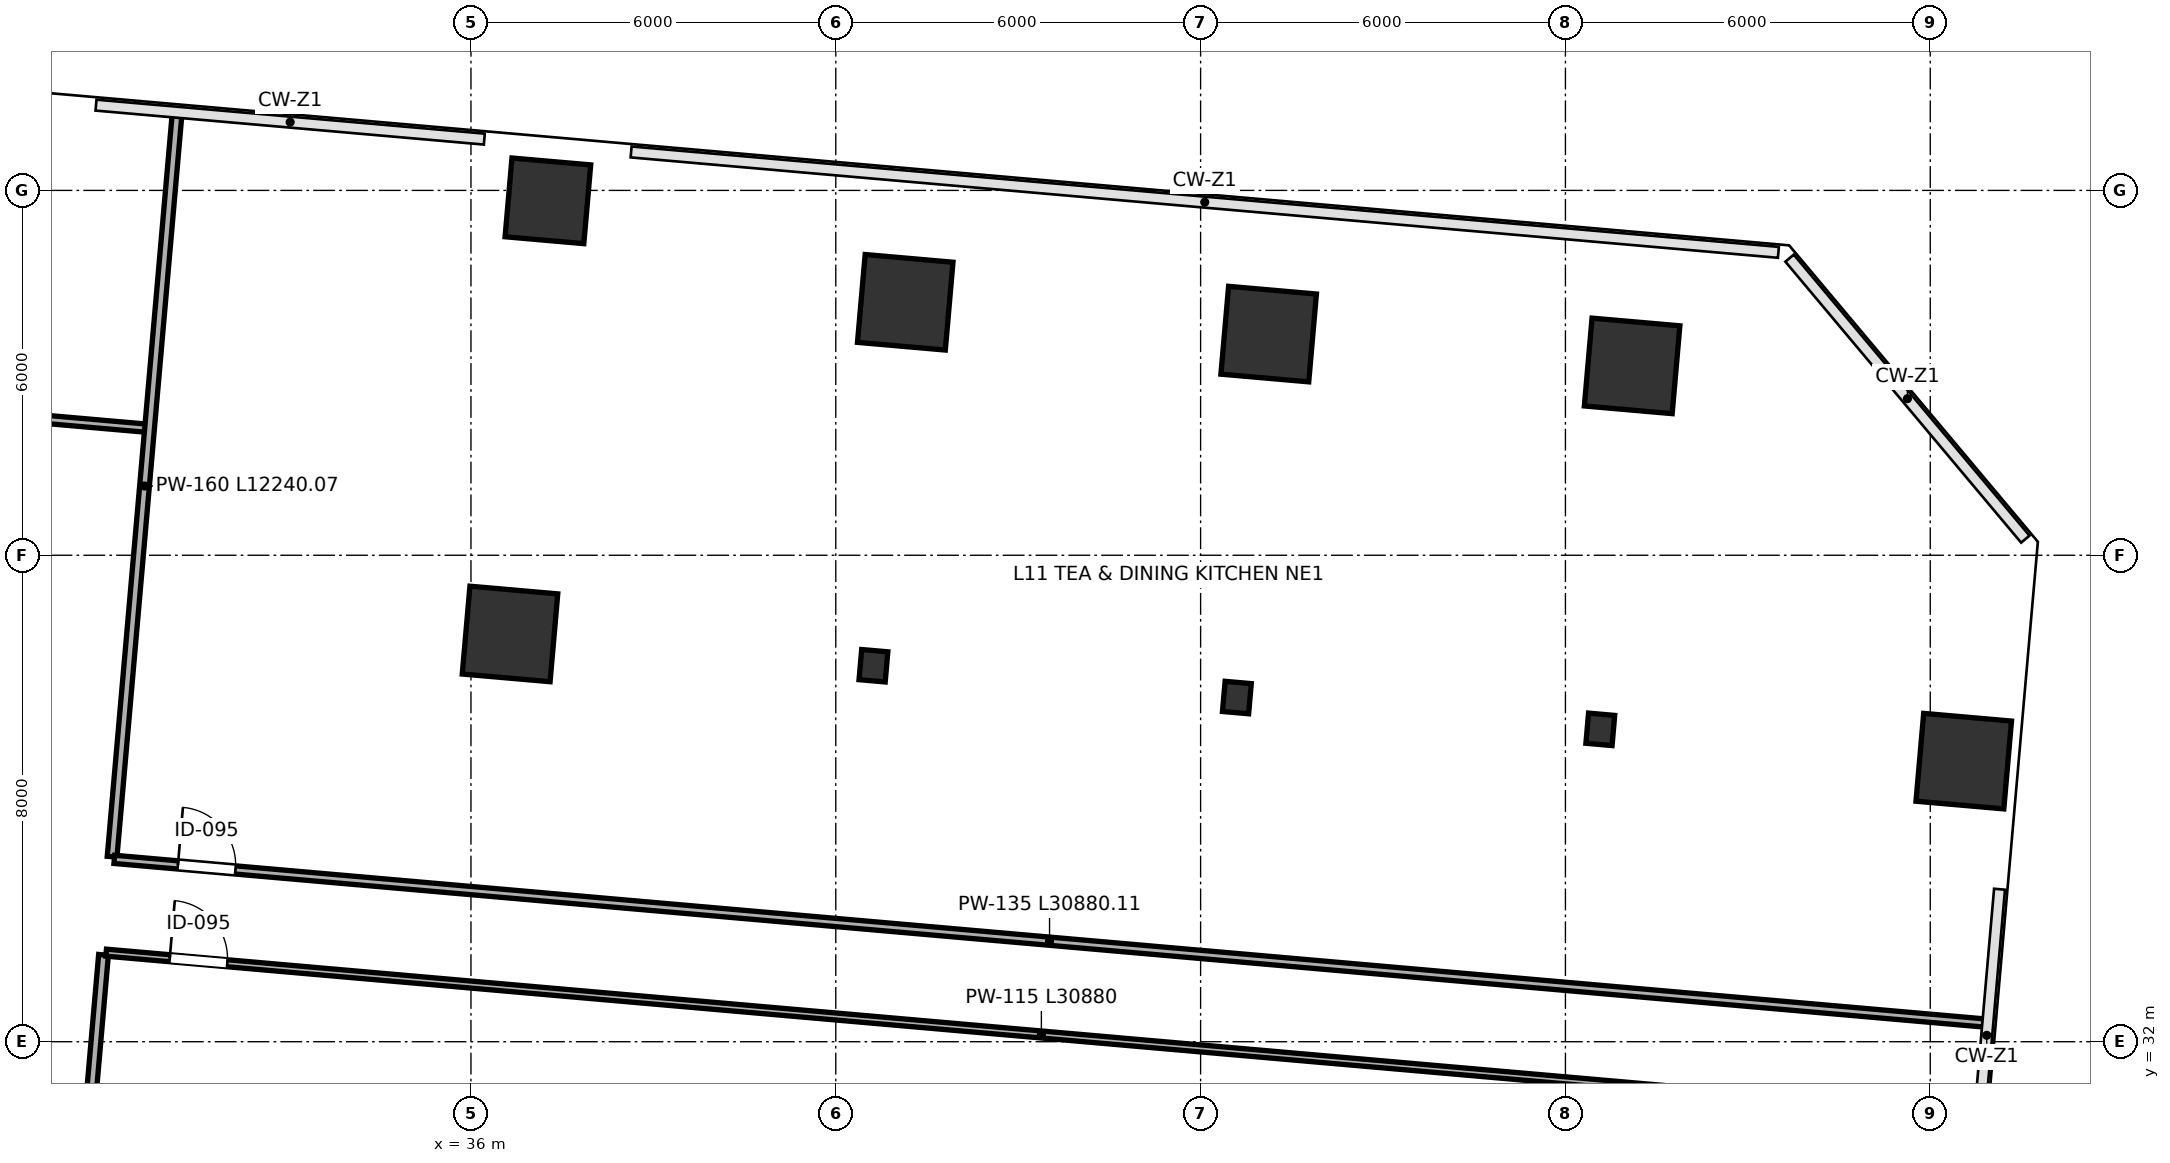
"""IFC4 building model, lengths in metres.
Left out: names, types, materials, properties, quantities, classifications, styles, units other than length and angle.
Written with IfcOpenShell. Run it as: python <this file> out.ifc"""

import sys

from ifc_helpers import new_model, si_unit, direction, frame, frame_2d, origin, origin_2d, place, context, subcontext, project, spatial, rectangle, i_section, extrude, clip, halfspace, source, transform, mapped, element, fill, save


model = new_model("IFC4")
c1 = context("Model", 3, precision=1e-05, world=origin(), true_north=direction((0.0, 1.0)))
c2 = subcontext(c1, "Body", "Model", "MODEL_VIEW")
j1 = project(units=[si_unit("LENGTHUNIT", "METRE"), si_unit("PLANEANGLEUNIT", "RADIAN")], contexts=[c1])
p1 = place(None, origin())
s1 = spatial("IfcSite", under=j1, at=p1, CompositionType="ELEMENT")
p2 = place(p1, origin())
s2 = spatial("IfcBuilding", under=s1, at=p2, CompositionType="ELEMENT")
p3 = place(p2, frame((0.0, 0.0, 52.0)))
s3 = spatial("IfcBuildingStorey", under=s2, at=p3, CompositionType="ELEMENT", Elevation=52.0)
p4 = place(p3, frame((28.3, 46.613, 0.0), z_axis=(0.06589332662, -0.031551692962, 0.997327709521), x_axis=(-0.508628404155, -0.860962602344, 0.006367405439)))
e1 = element("IfcColumn", 1, at=p4, inside=s3, PredefinedType="COLUMN", context=c2, shape_type="Clipping", body=[
    clip(clip(extrude(rectangle(XDim=1.3, YDim=1.3, at=origin_2d()), origin(), (0.0, 0.0, 1.0), 4.813), halfspace(frame((0.0, 0.0, 0.052), z_axis=(0.0, 0.0, -1.0), x_axis=(1.0, 0.0, 0.0)), False)), halfspace(frame((0.0, 0.0, 4.761), z_axis=(0.0, 0.0, 1.0), x_axis=(1.0, 0.0, 0.0)), False)),
])
p5 = place(p3, frame((36.642, 38.706, 0.0), z_axis=(0.029670337243, -0.068977194275, 0.997176924), x_axis=(-0.949466178775, -0.313801126567, 0.006544335611)))
e2 = element("IfcColumn", 2, at=p5, inside=s3, PredefinedType="COLUMN", context=c2, shape_type="Clipping", body=[
    clip(clip(extrude(rectangle(XDim=1.45, YDim=1.45, at=origin_2d()), origin(), (0.0, 0.0, 1.0), 4.814), halfspace(frame((0.0, 0.0, 0.06), z_axis=(0.0, 0.0, -1.0), x_axis=(1.0, 0.0, 0.0)), False)), halfspace(frame((0.0, 0.0, 4.754), z_axis=(0.0, 0.0, 1.0), x_axis=(1.0, 0.0, 0.0)), False)),
])
p6 = place(p3, frame((37.265, 45.829, 0.0), z_axis=(0.061822361159, -0.071999506607, 0.995486849089), x_axis=(-0.812325724123, -0.583145357305, 0.008271044762)))
e3 = element("IfcColumn", 3, at=p6, inside=s3, PredefinedType="COLUMN", context=c2, shape_type="Clipping", body=[
    clip(clip(extrude(rectangle(XDim=1.3, YDim=1.3, at=origin_2d()), origin(), (0.0, 0.0, 1.0), 4.822), halfspace(frame((0.0, 0.0, 0.068), z_axis=(0.0, 0.0, -1.0), x_axis=(1.0, 0.0, 0.0)), False)), halfspace(frame((0.0, 0.0, 4.754), z_axis=(0.0, 0.0, 1.0), x_axis=(1.0, 0.0, 0.0)), False)),
])
p7 = place(p3, frame((42.619, 38.183, 0.0), z_axis=(0.026924325259, -0.09580403706, 0.995036013013), x_axis=(-0.982504678584, -0.186035828863, 0.008673346471)))
e4 = element("IfcColumn", 4, at=p7, inside=s3, PredefinedType="COLUMN", context=c2, shape_type="Clipping", body=[
    clip(clip(extrude(i_section(OverallWidth=0.432, OverallDepth=0.498, WebThickness=0.056, FlangeThickness=0.089, FilletRadius=0.015, at=origin_2d()), origin(), (0.0, 0.0, 1.0), 4.824), halfspace(frame((0.0, 0.0, 0.027), z_axis=(0.0, 0.0, -1.0), x_axis=(1.0, 0.0, 0.0)), False)), halfspace(frame((0.0, 0.0, 4.797), z_axis=(0.0, 0.0, 1.0), x_axis=(1.0, 0.0, 0.0)), False)),
])
p8 = place(p3, frame((43.142, 44.16, 0.0), z_axis=(0.053877269241, -0.098303272676, 0.993696989248), x_axis=(-0.915216687405, -0.402843592449, 0.009770113497)))
e5 = element("IfcColumn", 5, at=p8, inside=s3, PredefinedType="COLUMN", context=c2, shape_type="Clipping", body=[
    clip(clip(extrude(rectangle(XDim=1.45, YDim=1.45, at=origin_2d()), origin(), (0.0, 0.0, 1.0), 4.831), halfspace(frame((0.0, 0.0, 0.089), z_axis=(0.0, 0.0, -1.0), x_axis=(1.0, 0.0, 0.0)), False)), halfspace(frame((0.0, 0.0, 4.741), z_axis=(0.0, 0.0, 1.0), x_axis=(1.0, 0.0, 0.0)), False)),
])
p9 = place(p3, frame((48.596, 37.66, 0.0), z_axis=(0.02417236025, -0.122476656215, 0.992176983044), x_axis=(-0.99408551694, -0.108053693523, 0.010880456154)))
e6 = element("IfcColumn", 6, at=p9, inside=s3, PredefinedType="COLUMN", context=c2, shape_type="Clipping", body=[
    clip(clip(extrude(i_section(OverallWidth=0.432, OverallDepth=0.498, WebThickness=0.056, FlangeThickness=0.089, FilletRadius=0.015, at=origin_2d()), origin(), (0.0, 0.0, 1.0), 4.838), halfspace(frame((0.0, 0.0, 0.034), z_axis=(0.0, 0.0, -1.0), x_axis=(1.0, 0.0, 0.0)), False)), halfspace(frame((0.0, 0.0, 4.803), z_axis=(0.0, 0.0, 1.0), x_axis=(1.0, 0.0, 0.0)), False)),
])
p10 = place(p3, frame((49.119, 43.637, 0.0), z_axis=(0.051051601458, -0.124983190143, 0.990844557017), x_axis=(-0.954881453991, -0.296754029116, 0.011766691454)))
e7 = element("IfcColumn", 7, at=p10, inside=s3, PredefinedType="COLUMN", context=c2, shape_type="Clipping", body=[
    clip(clip(extrude(rectangle(XDim=1.45, YDim=1.45, at=origin_2d()), origin(), (0.0, 0.0, 1.0), 4.844), halfspace(frame((0.0, 0.0, 0.108), z_axis=(0.0, 0.0, -1.0), x_axis=(1.0, 0.0, 0.0)), False)), halfspace(frame((0.0, 0.0, 4.737), z_axis=(0.0, 0.0, 1.0), x_axis=(1.0, 0.0, 0.0)), False)),
])
p11 = place(p3, frame((54.573, 37.137, 0.0), z_axis=(0.021471147851, -0.148839807117, 0.988628191803), x_axis=(-0.998290790229, -0.056953640273, 0.013106525213)))
e8 = element("IfcColumn", 8, at=p11, inside=s3, PredefinedType="COLUMN", context=c2, shape_type="Clipping", body=[
    clip(clip(extrude(i_section(OverallWidth=0.432, OverallDepth=0.498, WebThickness=0.056, FlangeThickness=0.089, FilletRadius=0.015, at=origin_2d()), origin(), (0.0, 0.0, 1.0), 4.855), halfspace(frame((0.0, 0.0, 0.041), z_axis=(0.0, 0.0, -1.0), x_axis=(1.0, 0.0, 0.0)), False)), halfspace(frame((0.0, 0.0, 4.814), z_axis=(0.0, 0.0, 1.0), x_axis=(1.0, 0.0, 0.0)), False)),
])
p12 = place(p3, frame((55.096, 43.114, 0.0), z_axis=(0.048258163497, -0.151302649966, 0.987308795549), x_axis=(-0.975236227895, -0.220732225493, 0.013841402757)))
e9 = element("IfcColumn", 9, at=p12, inside=s3, PredefinedType="COLUMN", context=c2, shape_type="Clipping", body=[
    clip(clip(extrude(rectangle(XDim=1.45, YDim=1.45, at=origin_2d()), origin(), (0.0, 0.0, 1.0), 4.862), halfspace(frame((0.0, 0.0, 0.127), z_axis=(0.0, 0.0, -1.0), x_axis=(1.0, 0.0, 0.0)), False)), halfspace(frame((0.0, 0.0, 4.735), z_axis=(0.0, 0.0, 1.0), x_axis=(1.0, 0.0, 0.0)), False)),
])
p13 = place(p3, frame((60.551, 36.614, 0.0), z_axis=(0.018725699159, -0.174940087863, 0.984400992406), x_axis=(-0.999667743426, -0.020718762874, 0.015334132473)))
e10 = element("IfcColumn", 10, at=p13, inside=s3, PredefinedType="COLUMN", context=c2, shape_type="Clipping", body=[
    clip(clip(extrude(rectangle(XDim=1.45, YDim=1.45, at=origin_2d()), origin(), (0.0, 0.0, 1.0), 4.876), halfspace(frame((0.0, 0.0, 0.141), z_axis=(0.0, 0.0, -1.0), x_axis=(1.0, 0.0, 0.0)), False)), halfspace(frame((0.0, 0.0, 4.735), z_axis=(0.0, 0.0, 1.0), x_axis=(1.0, 0.0, 0.0)), False)),
])
p14 = place(p3, frame((5.7, 44.274, 0.0), z_axis=(0.0, 0.0, 1.0), x_axis=(0.996195324028, -0.087148587968, 0.0)))
e11 = element("IfcWall", 11, at=p14, inside=s3, PredefinedType="PARTITIONING", context=c2, shape_type="SweptSolid", body=[
    extrude(rectangle(XDim=25.07, YDim=0.135, at=frame_2d((12.535, 0.0))), origin(), (0.0, 0.0, 1.0), 4.56),
])
p15 = place(p14, frame((1.05, 0.0, 0.0)))
e12 = element("IfcOpeningElement", 12, at=p15, cuts=e11, PredefinedType="OPENING", context=c2, shape_type="SweptSolid", body=[
    extrude(rectangle(XDim=0.95, YDim=2.15, at=frame_2d((0.475, 1.075))), frame((0.0, 0.078, 0.0), z_axis=(0.0, -1.0, 0.0), x_axis=(1.0, 0.0, 0.0)), (0.0, 0.0, 1.0), 0.155),
])
p16 = place(p3, frame((30.098, 35.042, 0.0), z_axis=(0.0, 0.0, 1.0), x_axis=(0.087145176091, 0.996195622498, 0.0)))
e13 = element("IfcWall", 13, at=p16, inside=s3, PredefinedType="PARTITIONING", context=c2, shape_type="SweptSolid", body=[
    extrude(rectangle(XDim=12.24, YDim=0.16, at=frame_2d((6.12, 0.0))), origin(), (0.0, 0.0, 1.0), 3.695),
])
p17 = place(p3, frame((28.198, 13.325, 0.0), z_axis=(0.0, 0.0, 1.0), x_axis=(0.087154794008, 0.996194781095, 0.0)))
e14 = element("IfcWall", 14, at=p17, inside=s3, PredefinedType="PARTITIONING", context=c2, shape_type="SweptSolid", body=[
    extrude(rectangle(XDim=20.18, YDim=0.16, at=frame_2d((10.09, 0.0))), origin(), (0.0, 0.0, 1.0), 4.56),
])
p18 = place(p3, frame((30.134, 34.999, 0.0), z_axis=(0.0, 0.0, 1.0), x_axis=(0.996195270611, -0.087149198574, 0.0)))
e15 = element("IfcWall", 15, at=p18, inside=s3, PredefinedType="PARTITIONING", context=c2, shape_type="SweptSolid", body=[
    extrude(rectangle(XDim=30.88, YDim=0.135, at=frame_2d((15.44, 0.0))), origin(), (0.0, 0.0, 1.0), 3.695),
])
p19 = place(p18, frame((1.05, 0.0, 0.0)))
e16 = element("IfcOpeningElement", 16, at=p19, cuts=e15, PredefinedType="OPENING", context=c2, shape_type="SweptSolid", body=[
    extrude(rectangle(XDim=0.95, YDim=2.15, at=frame_2d((0.475, 1.075))), frame((0.0, 0.078, 0.0), z_axis=(0.0, -1.0, 0.0), x_axis=(1.0, 0.0, 0.0)), (0.0, 0.0, 1.0), 0.155),
])
p20 = place(p3, frame((30.0, 33.465, 0.0), z_axis=(0.0, 0.0, 1.0), x_axis=(0.996195270611, -0.087149198574, 0.0)))
e17 = element("IfcWall", 17, at=p20, inside=s3, PredefinedType="PARTITIONING", context=c2, shape_type="SweptSolid", body=[
    extrude(rectangle(XDim=30.88, YDim=0.115, at=frame_2d((15.44, 0.0))), origin(), (0.0, 0.0, 1.0), 3.695),
])
p21 = place(p20, frame((1.05, 0.0, 0.0)))
e18 = element("IfcOpeningElement", 18, at=p21, cuts=e17, PredefinedType="OPENING", context=c2, shape_type="SweptSolid", body=[
    extrude(rectangle(XDim=0.95, YDim=2.15, at=frame_2d((0.475, 1.075))), frame((0.0, 0.067, 0.0), z_axis=(0.0, -1.0, 0.0), x_axis=(1.0, 0.0, 0.0)), (0.0, 0.0, 1.0), 0.135),
])
m1 = source(origin(), c2, "Body", "SweptSolid", [
    extrude(rectangle(XDim=0.95, YDim=2.15, at=frame_2d((0.475, 1.075))), frame((0.0, 0.025, 0.0), z_axis=(0.0, -1.0, 0.0), x_axis=(1.0, 0.0, 0.0)), (0.0, 0.0, 1.0), 0.05),
])
p22 = place(p19, origin())
e19 = element("IfcDoor", 19, at=p22, inside=s3, OperationType="SINGLE_SWING_LEFT", PredefinedType="DOOR", context=c2, shape_type="MappedRepresentation", body=[
    mapped(m1, transform((0.0, 0.0, 0.0), scale=1.0)),
])
fill(e16, e19)
p23 = place(p21, origin())
e20 = element("IfcDoor", 20, at=p23, inside=s3, OperationType="SINGLE_SWING_LEFT", PredefinedType="DOOR", context=c2, shape_type="MappedRepresentation", body=[
    mapped(m1, transform((0.0, 0.0, 0.0), scale=1.0)),
])
fill(e18, e20)
save(model, sys.argv[1])
